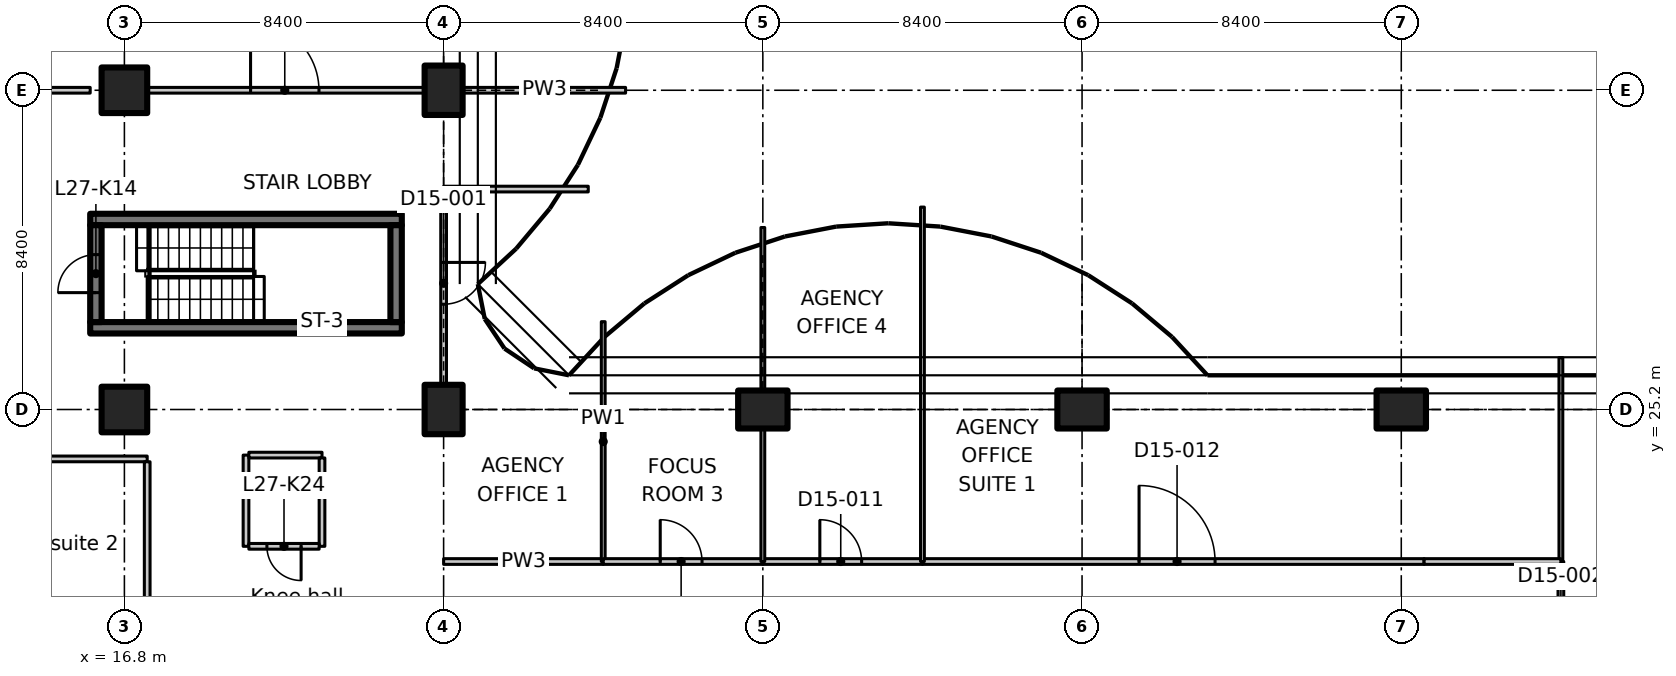
"""IFC4 building model, lengths in metres.
Left out: names, types, materials, properties, quantities, classifications, styles, units other than length and angle.
Written with IfcOpenShell. Run it as: python <this file> out.ifc"""

import sys

from ifc_helpers import new_model, si_unit, direction, frame, frame_2d, origin, origin_2d, place, context, subcontext, project, spatial, polyline, rectangle, outline, extrude, element, fill, save


model = new_model("IFC4")
c1 = context("Model", 3, precision=1e-05, world=origin(), true_north=direction((0.0, 1.0)))
c2 = subcontext(c1, "Body", "Model", "MODEL_VIEW")
j1 = project(units=[si_unit("LENGTHUNIT", "METRE"), si_unit("PLANEANGLEUNIT", "RADIAN")], contexts=[c1])
p1 = place(None, origin())
s1 = spatial("IfcSite", under=j1, at=p1, CompositionType="ELEMENT")
p2 = place(p1, origin())
s2 = spatial("IfcBuilding", under=s1, at=p2, CompositionType="ELEMENT")
p3 = place(p2, frame((0.0, 0.0, 113.3)))
s3 = spatial("IfcBuildingStorey", under=s2, at=p3, CompositionType="ELEMENT", Elevation=113.3)
for number, where, z_axis, x_axis in (
    (1, (16.8, 25.2, 0.0), (0.0, 0.0, 1.0), (1.0, 0.0, 0.0)),
    (2, (16.8, 33.6, 0.0), (0.0, 0.0, 1.0), (1.0, 0.0, 0.0)),
):
    element("IfcColumn", number, at=place(p3, frame(where, z_axis=z_axis, x_axis=x_axis)), inside=s3, PredefinedType="COLUMN", context=c2, shape_type="SweptSolid", body=[
        extrude(rectangle(XDim=1.2, YDim=1.2, at=origin_2d()), origin(), (0.0, 0.0, 1.0), 3.35),
    ])
for number, where, z_axis, x_axis in (
    (3, (25.2, 25.2, 0.0), (0.0, 0.0, 1.0), (1.0, 0.0, 0.0)),
    (4, (25.2, 33.6, 0.0), (0.0, 0.0, 1.0), (1.0, 0.0, 0.0)),
    (5, (33.6, 25.2, 0.0), (0.0, 0.0, 1.0), (0.0, 1.0, 0.0)),
    (6, (42.0, 25.2, 0.0), (0.0, 0.0, 1.0), (0.0, 1.0, 0.0)),
    (7, (50.4, 25.2, 0.0), (0.0, 0.0, 1.0), (0.0, 1.0, 0.0)),
):
    element("IfcColumn", number, at=place(p3, frame(where, z_axis=z_axis, x_axis=x_axis)), inside=s3, PredefinedType="COLUMN", context=c2, shape_type="SweptSolid", body=[
        extrude(rectangle(XDim=1.0, YDim=1.3, at=origin_2d()), origin(), (0.0, 0.0, 1.0), 3.35),
    ])
for number, where, z_axis, x_axis in (
    (8, (15.9, 27.35, 0.0), (0.0, 0.0, 1.0), (1.0, 0.0, 0.0)),
    (9, (15.9, 30.2, 0.0), (0.0, 0.0, 1.0), (1.0, 0.0, 0.0)),
):
    element("IfcWall", number, at=place(p3, frame(where, z_axis=z_axis, x_axis=x_axis)), inside=s3, PredefinedType="SHEAR", context=c2, shape_type="SweptSolid", body=[
        extrude(rectangle(XDim=8.2, YDim=0.3, at=frame_2d((4.1, 0.0))), origin(), (0.0, 0.0, 1.0), 3.35),
    ])
p4 = place(p3, frame((16.05, 27.5, 0.0), z_axis=(0.0, 0.0, 1.0), x_axis=(0.0, 1.0, 0.0)))
e10 = element("IfcWall", 10, at=p4, inside=s3, PredefinedType="SHEAR", context=c2, shape_type="SweptSolid", body=[
    extrude(rectangle(XDim=2.55, YDim=0.3, at=frame_2d((1.275, 0.0))), origin(), (0.0, 0.0, 1.0), 3.35),
])
p5 = place(p4, frame((0.775, 0.0, 0.0)))
e11 = element("IfcOpeningElement", 11, at=p5, cuts=e10, PredefinedType="OPENING", context=c2, shape_type="SweptSolid", body=[
    extrude(rectangle(XDim=1.0, YDim=2.1, at=frame_2d((0.5, 1.05))), frame((0.0, 0.16, 0.0), z_axis=(0.0, -1.0, 0.0), x_axis=(1.0, 0.0, 0.0)), (0.0, 0.0, 1.0), 0.32),
])
p6 = place(p3, frame((23.95, 27.5, 0.0), z_axis=(0.0, 0.0, 1.0), x_axis=(0.0, 1.0, 0.0)))
e12 = element("IfcWall", 12, at=p6, inside=s3, PredefinedType="SHEAR", context=c2, shape_type="SweptSolid", body=[
    extrude(rectangle(XDim=2.55, YDim=0.3, at=frame_2d((1.275, 0.0))), origin(), (0.0, 0.0, 1.0), 3.35),
])
p7 = place(p3, frame((12.9, 23.9, 0.0), z_axis=(0.0, 0.0, 1.0), x_axis=(1.0, 0.0, 0.0)))
e13 = element("IfcWall", 13, at=p7, inside=s3, PredefinedType="PARTITIONING", context=c2, shape_type="SweptSolid", body=[
    extrude(rectangle(XDim=4.5, YDim=0.15, at=frame_2d((2.25, 0.0))), origin(), (0.0, 0.0, 1.0), 3.35),
])
p8 = place(p3, frame((17.4, 23.825, 0.0), z_axis=(0.0, 0.0, 1.0), x_axis=(0.0, -1.0, 0.0)))
e14 = element("IfcWall", 14, at=p8, inside=s3, PredefinedType="PARTITIONING", context=c2, shape_type="SweptSolid", body=[
    extrude(rectangle(XDim=4.425, YDim=0.15, at=frame_2d((2.212, 0.0))), origin(), (0.0, 0.0, 1.0), 3.35),
])
p9 = place(p3, frame((20.0, 21.6, 0.0), z_axis=(0.0, 0.0, 1.0), x_axis=(0.0, 1.0, 0.0)))
e15 = element("IfcWall", 15, at=p9, inside=s3, PredefinedType="PARTITIONING", context=c2, shape_type="SweptSolid", body=[
    extrude(rectangle(XDim=2.4, YDim=0.15, at=frame_2d((1.2, 0.0))), origin(), (0.0, 0.0, 1.0), 3.35),
])
p10 = place(p3, frame((20.075, 24.0, 0.0), z_axis=(0.0, 0.0, 1.0), x_axis=(1.0, 0.0, 0.0)))
e16 = element("IfcWall", 16, at=p10, inside=s3, PredefinedType="PARTITIONING", context=c2, shape_type="SweptSolid", body=[
    extrude(rectangle(XDim=1.925, YDim=0.15, at=frame_2d((0.962, 0.0))), origin(), (0.0, 0.0, 1.0), 3.35),
])
p11 = place(p3, frame((22.0, 23.925, 0.0), z_axis=(0.0, 0.0, 1.0), x_axis=(0.0, -1.0, 0.0)))
e17 = element("IfcWall", 17, at=p11, inside=s3, PredefinedType="PARTITIONING", context=c2, shape_type="SweptSolid", body=[
    extrude(rectangle(XDim=2.325, YDim=0.15, at=frame_2d((1.163, 0.0))), origin(), (0.0, 0.0, 1.0), 3.35),
])
p12 = place(p3, frame((21.925, 21.6, 0.0), z_axis=(0.0, 0.0, 1.0), x_axis=(-1.0, 0.0, 0.0)))
e18 = element("IfcWall", 18, at=p12, inside=s3, PredefinedType="PARTITIONING", context=c2, shape_type="SweptSolid", body=[
    extrude(rectangle(XDim=1.85, YDim=0.15, at=frame_2d((0.925, 0.0))), origin(), (0.0, 0.0, 1.0), 3.35),
])
p13 = place(p12, frame((0.475, 0.0, 0.0)))
e19 = element("IfcOpeningElement", 19, at=p13, cuts=e18, PredefinedType="OPENING", context=c2, shape_type="SweptSolid", body=[
    extrude(rectangle(XDim=0.9, YDim=2.1, at=frame_2d((0.45, 1.05))), frame((0.0, 0.085, 0.0), z_axis=(0.0, -1.0, 0.0), x_axis=(1.0, 0.0, 0.0)), (0.0, 0.0, 1.0), 0.17),
])
p14 = place(p3, frame((25.2, 21.2, 0.0), z_axis=(0.0, 0.0, 1.0), x_axis=(1.0, 0.0, 0.0)))
e20 = element("IfcWall", 20, at=p14, inside=s3, PredefinedType="PARTITIONING", context=c2, shape_type="SweptSolid", body=[
    extrude(rectangle(XDim=4.2, YDim=0.15, at=frame_2d((2.1, 0.0))), origin(), (0.0, 0.0, 1.0), 3.33),
])
p15 = place(p3, frame((29.4, 27.511, 0.0), z_axis=(0.0, 0.0, 1.0), x_axis=(0.0, -1.0, 0.0)))
e21 = element("IfcWall", 21, at=p15, inside=s3, PredefinedType="PARTITIONING", context=c2, shape_type="SweptSolid", body=[
    extrude(outline(polyline([(0.0, 0.0), (6.311, 0.0), (6.311, 3.33), (2.761, 3.33), (2.759, 2.98), (1.863, 2.98), (1.861, 3.33), (0.236, 3.33), (0.0, 3.33), (0.0, 0.0)])), frame((0.0, 0.05, 0.0), z_axis=(0.0, -1.0, 0.0), x_axis=(1.0, 0.0, 0.0)), (0.0, 0.0, 1.0), 0.1),
])
p16 = place(p3, frame((25.2, 31.0, 0.0), z_axis=(0.0, 0.0, 1.0), x_axis=(0.0, -1.0, 0.0)))
e22 = element("IfcWall", 22, at=p16, inside=s3, PredefinedType="PARTITIONING", context=c2, shape_type="SweptSolid", body=[
    extrude(outline(polyline([(0.0, 0.0), (5.13, 0.0), (5.13, 2.98), (0.0, 2.98), (0.0, 0.0)])), frame((0.0, 0.075, 0.0), z_axis=(0.0, -1.0, 0.0), x_axis=(1.0, 0.0, 0.0)), (0.0, 0.0, 1.0), 0.15),
])
p17 = place(p16, frame((1.93, 0.0, 0.0)))
e23 = element("IfcOpeningElement", 23, at=p17, cuts=e22, PredefinedType="OPENING", context=c2, shape_type="SweptSolid", body=[
    extrude(rectangle(XDim=1.1, YDim=2.1, at=frame_2d((0.55, 1.05))), frame((0.0, 0.085, 0.0), z_axis=(0.0, -1.0, 0.0), x_axis=(1.0, 0.0, 0.0)), (0.0, 0.0, 1.0), 0.17),
])
p18 = place(p3, frame((25.2, 31.0, 0.0), z_axis=(0.0, 0.0, 1.0), x_axis=(1.0, 0.0, 0.0)))
e24 = element("IfcWall", 24, at=p18, inside=s3, PredefinedType="PARTITIONING", context=c2, shape_type="SweptSolid", body=[
    extrude(rectangle(XDim=3.806, YDim=0.15, at=frame_2d((1.903, 0.0))), origin(), (0.0, 0.0, 1.0), 2.98),
])
p19 = place(p3, frame((54.6, 21.2, 0.0), z_axis=(0.0, 0.0, 1.0), x_axis=(0.0, -1.0, 0.0)))
e25 = element("IfcWall", 25, at=p19, inside=s3, PredefinedType="PARTITIONING", context=c2, shape_type="SweptSolid", body=[
    extrude(rectangle(XDim=8.2, YDim=0.15, at=frame_2d((4.1, 0.0))), origin(), (0.0, 0.0, 1.0), 3.33),
])
p20 = place(p19, frame((3.2, 0.0, 0.0)))
e26 = element("IfcOpeningElement", 26, at=p20, cuts=e25, PredefinedType="OPENING", context=c2, shape_type="SweptSolid", body=[
    extrude(rectangle(XDim=2.0, YDim=2.4, at=frame_2d((1.0, 1.2))), frame((0.0, 0.085, 0.0), z_axis=(0.0, -1.0, 0.0), x_axis=(1.0, 0.0, 0.0)), (0.0, 0.0, 1.0), 0.17),
])
p21 = place(p3, frame((54.6, 21.2, 0.0), z_axis=(0.0, 0.0, 1.0), x_axis=(0.0, 1.0, 0.0)))
e27 = element("IfcWall", 27, at=p21, inside=s3, PredefinedType="PARTITIONING", context=c2, shape_type="SweptSolid", body=[
    extrude(outline(polyline([(0.0, 0.0), (5.365, 0.0), (5.365, 3.33), (5.1, 3.33), (4.45, 3.33), (4.448, 2.98), (3.552, 2.98), (3.55, 3.33), (0.0, 3.33), (0.0, 0.0)])), frame((0.0, 0.05, 0.0), z_axis=(0.0, -1.0, 0.0), x_axis=(1.0, 0.0, 0.0)), (0.0, 0.0, 1.0), 0.1),
])
p22 = place(p3, frame((29.4, 21.2, 0.0), z_axis=(0.0, 0.0, 1.0), x_axis=(1.0, 0.0, 0.0)))
e28 = element("IfcWall", 28, at=p22, inside=s3, PredefinedType="PARTITIONING", context=c2, shape_type="SweptSolid", body=[
    extrude(rectangle(XDim=4.2, YDim=0.15, at=frame_2d((2.1, 0.0))), origin(), (0.0, 0.0, 1.0), 3.33),
])
p23 = place(p22, frame((1.5, 0.0, 0.0)))
e29 = element("IfcOpeningElement", 29, at=p23, cuts=e28, PredefinedType="OPENING", context=c2, shape_type="SweptSolid", body=[
    extrude(rectangle(XDim=1.1, YDim=2.1, at=frame_2d((0.55, 1.05))), frame((0.0, 0.085, 0.0), z_axis=(0.0, -1.0, 0.0), x_axis=(1.0, 0.0, 0.0)), (0.0, 0.0, 1.0), 0.17),
])
p24 = place(p3, frame((33.6, 21.2, 0.0), z_axis=(0.0, 0.0, 1.0), x_axis=(1.0, 0.0, 0.0)))
e30 = element("IfcWall", 30, at=p24, inside=s3, PredefinedType="PARTITIONING", context=c2, shape_type="SweptSolid", body=[
    extrude(rectangle(XDim=4.2, YDim=0.15, at=frame_2d((2.1, 0.0))), origin(), (0.0, 0.0, 1.0), 3.33),
])
p25 = place(p24, frame((1.5, 0.0, 0.0)))
e31 = element("IfcOpeningElement", 31, at=p25, cuts=e30, PredefinedType="OPENING", context=c2, shape_type="SweptSolid", body=[
    extrude(rectangle(XDim=1.1, YDim=2.1, at=frame_2d((0.55, 1.05))), frame((0.0, 0.085, 0.0), z_axis=(0.0, -1.0, 0.0), x_axis=(1.0, 0.0, 0.0)), (0.0, 0.0, 1.0), 0.17),
])
p26 = place(p3, frame((37.8, 21.2, 0.0), z_axis=(0.0, 0.0, 1.0), x_axis=(1.0, 0.0, 0.0)))
e32 = element("IfcWall", 32, at=p26, inside=s3, PredefinedType="PARTITIONING", context=c2, shape_type="SweptSolid", body=[
    extrude(rectangle(XDim=13.2, YDim=0.15, at=frame_2d((6.6, 0.0))), origin(), (0.0, 0.0, 1.0), 3.33),
])
p27 = place(p26, frame((5.7, 0.0, 0.0)))
e33 = element("IfcOpeningElement", 33, at=p27, cuts=e32, PredefinedType="OPENING", context=c2, shape_type="SweptSolid", body=[
    extrude(rectangle(XDim=2.0, YDim=2.4, at=frame_2d((1.0, 1.2))), frame((0.0, 0.085, 0.0), z_axis=(0.0, -1.0, 0.0), x_axis=(1.0, 0.0, 0.0)), (0.0, 0.0, 1.0), 0.17),
])
p28 = place(p3, frame((51.0, 21.2, 0.0), z_axis=(0.0, 0.0, 1.0), x_axis=(1.0, 0.0, 0.0)))
e34 = element("IfcWall", 34, at=p28, inside=s3, PredefinedType="PARTITIONING", context=c2, shape_type="SweptSolid", body=[
    extrude(rectangle(XDim=3.6, YDim=0.15, at=frame_2d((1.8, 0.0))), origin(), (0.0, 0.0, 1.0), 3.33),
])
p29 = place(p3, frame((33.6, 29.988, 0.0), z_axis=(0.0, 0.0, 1.0), x_axis=(0.0, -1.0, 0.0)))
e35 = element("IfcWall", 35, at=p29, inside=s3, PredefinedType="PARTITIONING", context=c2, shape_type="SweptSolid", body=[
    extrude(rectangle(XDim=4.268, YDim=0.1, at=frame_2d((2.134, 0.0))), origin(), (0.0, 0.0, 1.0), 2.98),
])
p30 = place(p3, frame((33.6, 24.68, 0.0), z_axis=(0.0, 0.0, 1.0), x_axis=(0.0, -1.0, 0.0)))
e36 = element("IfcWall", 36, at=p30, inside=s3, PredefinedType="PARTITIONING", context=c2, shape_type="SweptSolid", body=[
    extrude(rectangle(XDim=3.48, YDim=0.1, at=frame_2d((1.74, 0.0))), origin(), (0.0, 0.0, 1.0), 3.33),
])
p31 = place(p3, frame((37.8, 30.526, 0.0), z_axis=(0.0, 0.0, 1.0), x_axis=(0.0, -1.0, 0.0)))
e37 = element("IfcWall", 37, at=p31, inside=s3, PredefinedType="PARTITIONING", context=c2, shape_type="SweptSolid", body=[
    extrude(outline(polyline([(0.0, 0.0), (9.326, 0.0), (9.326, 3.33), (5.776, 3.33), (5.774, 2.98), (4.878, 2.98), (4.876, 3.33), (0.283, 3.33), (0.0, 3.33), (0.0, 0.0)])), frame((0.0, 0.05, 0.0), z_axis=(0.0, -1.0, 0.0), x_axis=(1.0, 0.0, 0.0)), (0.0, 0.0, 1.0), 0.1),
])
p32 = place(p3, frame((14.4, 33.6, 0.0), z_axis=(0.0, 0.0, 1.0), x_axis=(1.0, 0.0, 0.0)))
e38 = element("IfcWall", 38, at=p32, inside=s3, PredefinedType="PARTITIONING", context=c2, shape_type="SweptSolid", body=[
    extrude(rectangle(XDim=1.5, YDim=0.15, at=frame_2d((0.75, 0.0))), origin(), (0.0, 0.0, 1.0), 3.33),
])
p33 = place(p3, frame((17.42, 33.6, 0.0), z_axis=(0.0, 0.0, 1.0), x_axis=(1.0, 0.0, 0.0)))
e39 = element("IfcWall", 39, at=p33, inside=s3, PredefinedType="PARTITIONING", context=c2, shape_type="SweptSolid", body=[
    extrude(rectangle(XDim=7.26, YDim=0.15, at=frame_2d((3.63, 0.0))), origin(), (0.0, 0.0, 1.0), 3.33),
])
p34 = place(p33, frame((2.7, 0.0, 0.0)))
e40 = element("IfcOpeningElement", 40, at=p34, cuts=e39, PredefinedType="OPENING", context=c2, shape_type="SweptSolid", body=[
    extrude(rectangle(XDim=1.8, YDim=2.1, at=frame_2d((0.9, 1.05))), frame((0.0, 0.085, 0.0), z_axis=(0.0, -1.0, 0.0), x_axis=(1.0, 0.0, 0.0)), (0.0, 0.0, 1.0), 0.17),
])
p35 = place(p3, frame((25.72, 33.6, 0.0), z_axis=(0.0, 0.0, 1.0), x_axis=(1.0, 0.0, 0.0)))
e41 = element("IfcWall", 41, at=p35, inside=s3, PredefinedType="PARTITIONING", context=c2, shape_type="SweptSolid", body=[
    extrude(rectangle(XDim=4.268, YDim=0.15, at=frame_2d((2.134, 0.0))), origin(), (0.0, 0.0, 1.0), 2.98),
])
p36 = place(p5, origin())
e42 = element("IfcDoor", 42, at=p36, inside=s3, OperationType="SINGLE_SWING_LEFT", PredefinedType="DOOR", context=c2, shape_type="SweptSolid", body=[
    extrude(rectangle(XDim=1.0, YDim=2.1, at=frame_2d((0.5, 1.05))), frame((0.0, 0.025, 0.0), z_axis=(0.0, -1.0, 0.0), x_axis=(1.0, 0.0, 0.0)), (0.0, 0.0, 1.0), 0.05),
])
fill(e11, e42)
p37 = place(p13, origin())
e43 = element("IfcDoor", 43, at=p37, inside=s3, OperationType="SINGLE_SWING_LEFT", PredefinedType="DOOR", context=c2, shape_type="SweptSolid", body=[
    extrude(rectangle(XDim=0.9, YDim=2.1, at=frame_2d((0.45, 1.05))), frame((0.0, 0.025, 0.0), z_axis=(0.0, -1.0, 0.0), x_axis=(1.0, 0.0, 0.0)), (0.0, 0.0, 1.0), 0.05),
])
fill(e19, e43)
p38 = place(p17, origin())
e44 = element("IfcDoor", 44, at=p38, inside=s3, OperationType="SINGLE_SWING_RIGHT", PredefinedType="DOOR", context=c2, shape_type="SweptSolid", body=[
    extrude(rectangle(XDim=1.1, YDim=2.1, at=frame_2d((0.55, 1.05))), frame((0.0, 0.025, 0.0), z_axis=(0.0, -1.0, 0.0), x_axis=(1.0, 0.0, 0.0)), (0.0, 0.0, 1.0), 0.05),
])
fill(e23, e44)
p39 = place(p23, origin())
e45 = element("IfcDoor", 45, at=p39, inside=s3, OperationType="SINGLE_SWING_LEFT", PredefinedType="DOOR", context=c2, shape_type="SweptSolid", body=[
    extrude(rectangle(XDim=1.1, YDim=2.1, at=frame_2d((0.55, 1.05))), frame((0.0, 0.025, 0.0), z_axis=(0.0, -1.0, 0.0), x_axis=(1.0, 0.0, 0.0)), (0.0, 0.0, 1.0), 0.05),
])
fill(e29, e45)
p40 = place(p25, origin())
e46 = element("IfcDoor", 46, at=p40, inside=s3, OperationType="SINGLE_SWING_LEFT", PredefinedType="DOOR", context=c2, shape_type="SweptSolid", body=[
    extrude(rectangle(XDim=1.1, YDim=2.1, at=frame_2d((0.55, 1.05))), frame((0.0, 0.025, 0.0), z_axis=(0.0, -1.0, 0.0), x_axis=(1.0, 0.0, 0.0)), (0.0, 0.0, 1.0), 0.05),
])
fill(e31, e46)
p41 = place(p27, origin())
e47 = element("IfcDoor", 47, at=p41, inside=s3, OperationType="DOUBLE_DOOR_SINGLE_SWING", PredefinedType="DOOR", context=c2, shape_type="SweptSolid", body=[
    extrude(rectangle(XDim=2.0, YDim=2.4, at=frame_2d((1.0, 1.2))), frame((0.0, 0.025, 0.0), z_axis=(0.0, -1.0, 0.0), x_axis=(1.0, 0.0, 0.0)), (0.0, 0.0, 1.0), 0.05),
])
fill(e33, e47)
p42 = place(p34, origin())
e48 = element("IfcDoor", 48, at=p42, inside=s3, OperationType="DOUBLE_DOOR_SINGLE_SWING", PredefinedType="DOOR", context=c2, shape_type="SweptSolid", body=[
    extrude(rectangle(XDim=1.8, YDim=2.1, at=frame_2d((0.9, 1.05))), frame((0.0, 0.025, 0.0), z_axis=(0.0, -1.0, 0.0), x_axis=(1.0, 0.0, 0.0)), (0.0, 0.0, 1.0), 0.05),
])
fill(e40, e48)
save(model, sys.argv[1])
